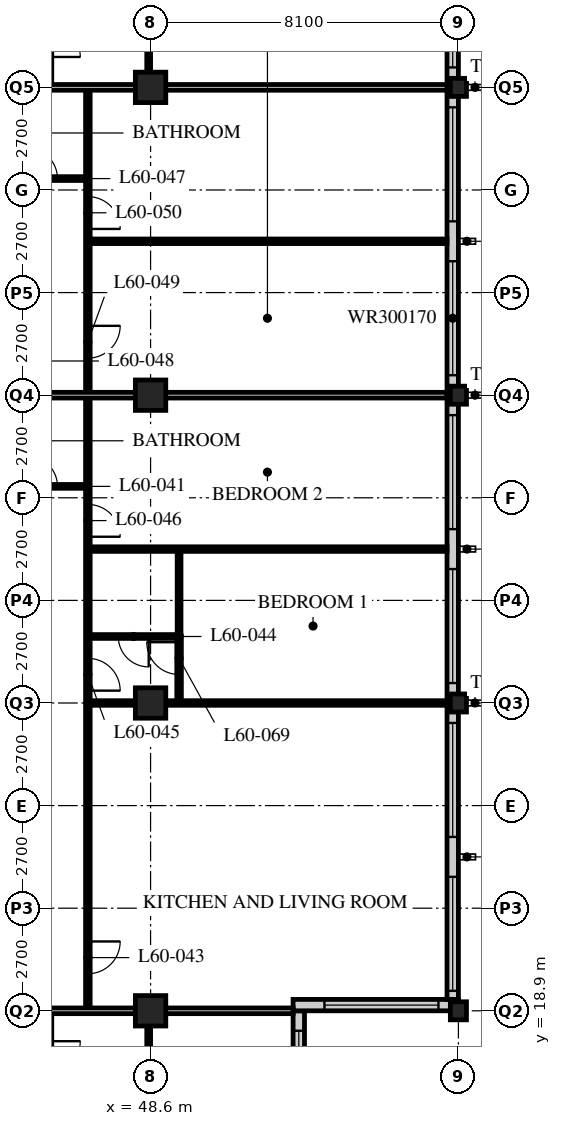
"""IFC4 building model, lengths in metres.
Left out: names, types, materials, properties, quantities, classifications, styles, units other than length and angle.
Written with IfcOpenShell. Run it as: python <this file> out.ifc"""

import sys

from ifc_helpers import new_model, si_unit, direction, frame, frame_2d, origin, origin_2d, place, context, subcontext, project, spatial, rectangle, hollow_rectangle, i_section, extrude, element, fill, save


model = new_model("IFC4")
c1 = context("Model", 3, precision=1e-05, world=origin(), true_north=direction((0.0, 1.0)))
c2 = subcontext(c1, "Body", "Model", "MODEL_VIEW")
j1 = project(units=[si_unit("LENGTHUNIT", "METRE"), si_unit("PLANEANGLEUNIT", "RADIAN")], contexts=[c1])
p1 = place(None, origin())
s1 = spatial("IfcSite", under=j1, at=p1, CompositionType="ELEMENT")
p2 = place(p1, origin())
s2 = spatial("IfcBuilding", under=s1, at=p2, CompositionType="ELEMENT")
p3 = place(p2, frame((0.0, 0.0, 231.6)))
s3 = spatial("IfcBuildingStorey", under=s2, at=p3, CompositionType="ELEMENT", Elevation=231.6)
for number, where, z_axis, x_axis in (
    (1, (48.6, 18.9, 0.0), (0.0, 0.0, 1.0), (1.0, 0.0, 0.0)),
    (2, (48.6, 27.0, 0.0), (0.0, 0.0, 1.0), (1.0, 0.0, 0.0)),
    (3, (48.6, 35.1, 0.0), (0.0, 0.0, 1.0), (1.0, 0.0, 0.0)),
    (4, (48.6, 43.2, 0.0), (0.0, 0.0, 1.0), (1.0, 0.0, 0.0)),
):
    element("IfcColumn", number, at=place(p3, frame(where, z_axis=z_axis, x_axis=x_axis)), inside=s3, PredefinedType="COLUMN", context=c2, shape_type="SweptSolid", body=[
        extrude(hollow_rectangle(XDim=0.8, YDim=0.8, WallThickness=0.08, at=origin_2d()), origin(), (0.0, 0.0, 1.0), 3.6),
    ])
for number, where, z_axis, x_axis in (
    (5, (56.7, 18.9, 0.0), (0.0, 0.0, 1.0), (1.0, 0.0, 0.0)),
    (6, (56.7, 27.0, 0.0), (0.0, 0.0, 1.0), (1.0, 0.0, 0.0)),
    (7, (56.7, 35.1, 0.0), (0.0, 0.0, 1.0), (1.0, 0.0, 0.0)),
    (8, (56.7, 43.2, 0.0), (0.0, 0.0, 1.0), (1.0, 0.0, 0.0)),
):
    element("IfcColumn", number, at=place(p3, frame(where, z_axis=z_axis, x_axis=x_axis)), inside=s3, PredefinedType="COLUMN", context=c2, shape_type="SweptSolid", body=[
        extrude(i_section(OverallWidth=0.424, OverallDepth=0.475, WebThickness=0.048, FlangeThickness=0.077, FilletRadius=0.015, at=origin_2d()), origin(), (0.0, 0.0, 1.0), 3.6),
    ])
p4 = place(p3, frame((52.5, 15.15, 0.0), z_axis=(0.0, 0.0, 1.0), x_axis=(0.0, 1.0, 0.0)))
e9 = element("IfcWall", 9, at=p4, inside=s3, PredefinedType="SOLIDWALL", context=c2, shape_type="SweptSolid", body=[
    extrude(rectangle(XDim=3.75, YDim=0.3, at=frame_2d((1.875, 0.0))), origin(), (0.0, 0.0, 1.0), 2.65),
])
p5 = place(p4, frame((0.225, 0.0, 0.6)))
e10 = element("IfcOpeningElement", 10, at=p5, cuts=e9, PredefinedType="OPENING", context=c2, shape_type="SweptSolid", body=[
    extrude(rectangle(XDim=3.0, YDim=1.7, at=frame_2d((1.5, 0.85))), frame((0.0, 0.16, 0.0), z_axis=(0.0, -1.0, 0.0), x_axis=(1.0, 0.0, 0.0)), (0.0, 0.0, 1.0), 0.32),
])
p6 = place(p3, frame((52.35, 19.05, 0.0), z_axis=(0.0, 0.0, 1.0), x_axis=(1.0, 0.0, 0.0)))
e11 = element("IfcWall", 11, at=p6, inside=s3, PredefinedType="SOLIDWALL", context=c2, shape_type="SweptSolid", body=[
    extrude(rectangle(XDim=4.35, YDim=0.3, at=frame_2d((2.175, 0.0))), origin(), (0.0, 0.0, 1.0), 2.35),
])
p7 = place(p6, frame((0.825, 0.0, 0.6)))
e12 = element("IfcOpeningElement", 12, at=p7, cuts=e11, PredefinedType="OPENING", context=c2, shape_type="SweptSolid", body=[
    extrude(rectangle(XDim=3.0, YDim=1.7, at=frame_2d((1.5, 0.85))), frame((0.0, 0.16, 0.0), z_axis=(0.0, -1.0, 0.0), x_axis=(1.0, 0.0, 0.0)), (0.0, 0.0, 1.0), 0.32),
])
p8 = place(p3, frame((56.55, 19.2, 0.0), z_axis=(0.0, 0.0, 1.0), x_axis=(0.0, 1.0, 0.0)))
e13 = element("IfcWall", 13, at=p8, inside=s3, PredefinedType="SOLIDWALL", context=c2, shape_type="SweptSolid", body=[
    extrude(rectangle(XDim=32.1, YDim=0.3, at=frame_2d((16.05, 0.0))), origin(), (0.0, 0.0, 1.0), 2.35),
])
p9 = place(p8, frame((0.225, 0.0, 0.6)))
e14 = element("IfcOpeningElement", 14, at=p9, cuts=e13, PredefinedType="OPENING", context=c2, shape_type="SweptSolid", body=[
    extrude(rectangle(XDim=3.0, YDim=1.7, at=frame_2d((1.5, 0.85))), frame((0.0, 0.16, 0.0), z_axis=(0.0, -1.0, 0.0), x_axis=(1.0, 0.0, 0.0)), (0.0, 0.0, 1.0), 0.32),
])
p10 = place(p8, frame((4.275, 0.0, 0.6)))
e15 = element("IfcOpeningElement", 15, at=p10, cuts=e13, PredefinedType="OPENING", context=c2, shape_type="SweptSolid", body=[
    extrude(rectangle(XDim=3.0, YDim=1.7, at=frame_2d((1.5, 0.85))), frame((0.0, 0.16, 0.0), z_axis=(0.0, -1.0, 0.0), x_axis=(1.0, 0.0, 0.0)), (0.0, 0.0, 1.0), 0.32),
])
p11 = place(p8, frame((8.325, 0.0, 0.6)))
e16 = element("IfcOpeningElement", 16, at=p11, cuts=e13, PredefinedType="OPENING", context=c2, shape_type="SweptSolid", body=[
    extrude(rectangle(XDim=3.0, YDim=1.7, at=frame_2d((1.5, 0.85))), frame((0.0, 0.16, 0.0), z_axis=(0.0, -1.0, 0.0), x_axis=(1.0, 0.0, 0.0)), (0.0, 0.0, 1.0), 0.32),
])
p12 = place(p8, frame((12.375, 0.0, 0.6)))
e17 = element("IfcOpeningElement", 17, at=p12, cuts=e13, PredefinedType="OPENING", context=c2, shape_type="SweptSolid", body=[
    extrude(rectangle(XDim=3.0, YDim=1.7, at=frame_2d((1.5, 0.85))), frame((0.0, 0.16, 0.0), z_axis=(0.0, -1.0, 0.0), x_axis=(1.0, 0.0, 0.0)), (0.0, 0.0, 1.0), 0.32),
])
p13 = place(p8, frame((16.425, 0.0, 0.6)))
e18 = element("IfcOpeningElement", 18, at=p13, cuts=e13, PredefinedType="OPENING", context=c2, shape_type="SweptSolid", body=[
    extrude(rectangle(XDim=3.0, YDim=1.7, at=frame_2d((1.5, 0.85))), frame((0.0, 0.16, 0.0), z_axis=(0.0, -1.0, 0.0), x_axis=(1.0, 0.0, 0.0)), (0.0, 0.0, 1.0), 0.32),
])
p14 = place(p8, frame((20.475, 0.0, 0.6)))
e19 = element("IfcOpeningElement", 19, at=p14, cuts=e13, PredefinedType="OPENING", context=c2, shape_type="SweptSolid", body=[
    extrude(rectangle(XDim=3.0, YDim=1.7, at=frame_2d((1.5, 0.85))), frame((0.0, 0.16, 0.0), z_axis=(0.0, -1.0, 0.0), x_axis=(1.0, 0.0, 0.0)), (0.0, 0.0, 1.0), 0.32),
])
p15 = place(p8, frame((24.525, 0.0, 0.6)))
e20 = element("IfcOpeningElement", 20, at=p15, cuts=e13, PredefinedType="OPENING", context=c2, shape_type="SweptSolid", body=[
    extrude(rectangle(XDim=3.0, YDim=1.7, at=frame_2d((1.5, 0.85))), frame((0.0, 0.16, 0.0), z_axis=(0.0, -1.0, 0.0), x_axis=(1.0, 0.0, 0.0)), (0.0, 0.0, 1.0), 0.32),
])
p16 = place(p8, frame((28.575, 0.0, 0.6)))
e21 = element("IfcOpeningElement", 21, at=p16, cuts=e13, PredefinedType="OPENING", context=c2, shape_type="SweptSolid", body=[
    extrude(rectangle(XDim=3.0, YDim=1.7, at=frame_2d((1.5, 0.85))), frame((0.0, 0.16, 0.0), z_axis=(0.0, -1.0, 0.0), x_axis=(1.0, 0.0, 0.0)), (0.0, 0.0, 1.0), 0.32),
])
p17 = place(p3, frame((46.95, 18.9, 0.0), z_axis=(0.0, 0.0, 1.0), x_axis=(0.0, 1.0, 0.0)))
e22 = element("IfcWall", 22, at=p17, inside=s3, PredefinedType="PARTITIONING", context=c2, shape_type="SweptSolid", body=[
    extrude(rectangle(XDim=24.3, YDim=0.12, at=frame_2d((12.15, 0.0))), origin(), (0.0, 0.0, 1.0), 3.35),
])
p18 = place(p17, frame((0.975, 0.0, 0.0)))
e23 = element("IfcOpeningElement", 23, at=p18, cuts=e22, PredefinedType="OPENING", context=c2, shape_type="SweptSolid", body=[
    extrude(rectangle(XDim=0.85, YDim=2.1, at=frame_2d((0.425, 1.05))), frame((0.0, 0.07, 0.0), z_axis=(0.0, -1.0, 0.0), x_axis=(1.0, 0.0, 0.0)), (0.0, 0.0, 1.0), 0.14),
])
p19 = place(p17, frame((8.425, 0.0, 0.0)))
e24 = element("IfcOpeningElement", 24, at=p19, cuts=e22, PredefinedType="OPENING", context=c2, shape_type="SweptSolid", body=[
    extrude(rectangle(XDim=0.85, YDim=2.1, at=frame_2d((0.425, 1.05))), frame((0.0, 0.07, 0.0), z_axis=(0.0, -1.0, 0.0), x_axis=(1.0, 0.0, 0.0)), (0.0, 0.0, 1.0), 0.14),
])
p20 = place(p17, frame((12.475, 0.0, 0.0)))
e25 = element("IfcOpeningElement", 25, at=p20, cuts=e22, PredefinedType="OPENING", context=c2, shape_type="SweptSolid", body=[
    extrude(rectangle(XDim=0.85, YDim=2.1, at=frame_2d((0.425, 1.05))), frame((0.0, 0.07, 0.0), z_axis=(0.0, -1.0, 0.0), x_axis=(1.0, 0.0, 0.0)), (0.0, 0.0, 1.0), 0.14),
])
p21 = place(p17, frame((17.175, 0.0, 0.0)))
e26 = element("IfcOpeningElement", 26, at=p21, cuts=e22, PredefinedType="OPENING", context=c2, shape_type="SweptSolid", body=[
    extrude(rectangle(XDim=0.85, YDim=2.1, at=frame_2d((0.425, 1.05))), frame((0.0, 0.07, 0.0), z_axis=(0.0, -1.0, 0.0), x_axis=(1.0, 0.0, 0.0)), (0.0, 0.0, 1.0), 0.14),
])
p22 = place(p17, frame((20.575, 0.0, 0.0)))
e27 = element("IfcOpeningElement", 27, at=p22, cuts=e22, PredefinedType="OPENING", context=c2, shape_type="SweptSolid", body=[
    extrude(rectangle(XDim=0.85, YDim=2.1, at=frame_2d((0.425, 1.05))), frame((0.0, 0.07, 0.0), z_axis=(0.0, -1.0, 0.0), x_axis=(1.0, 0.0, 0.0)), (0.0, 0.0, 1.0), 0.14),
])
p23 = place(p3, frame((44.55, 32.7, 0.0), z_axis=(0.0, 0.0, 1.0), x_axis=(1.0, 0.0, 0.0)))
e28 = element("IfcWall", 28, at=p23, inside=s3, PredefinedType="PARTITIONING", context=c2, shape_type="SweptSolid", body=[
    extrude(rectangle(XDim=2.4, YDim=0.1, at=frame_2d((1.2, 0.0))), origin(), (0.0, 0.0, 1.0), 3.35),
])
p24 = place(p23, frame((0.8, 0.0, 0.0)))
e29 = element("IfcOpeningElement", 29, at=p24, cuts=e28, PredefinedType="OPENING", context=c2, shape_type="SweptSolid", body=[
    extrude(rectangle(XDim=0.8, YDim=2.1, at=frame_2d((0.4, 1.05))), frame((0.0, 0.06, 0.0), z_axis=(0.0, -1.0, 0.0), x_axis=(1.0, 0.0, 0.0)), (0.0, 0.0, 1.0), 0.12),
])
p25 = place(p3, frame((46.95, 28.75, 0.0), z_axis=(0.0, 0.0, 1.0), x_axis=(1.0, 0.0, 0.0)))
e30 = element("IfcWall", 30, at=p25, inside=s3, PredefinedType="PARTITIONING", context=c2, shape_type="SweptSolid", body=[
    extrude(rectangle(XDim=2.4, YDim=0.1, at=frame_2d((1.2, 0.0))), origin(), (0.0, 0.0, 1.0), 3.35),
])
p26 = place(p25, frame((0.8, 0.0, 0.0)))
e31 = element("IfcOpeningElement", 31, at=p26, cuts=e30, PredefinedType="OPENING", context=c2, shape_type="SweptSolid", body=[
    extrude(rectangle(XDim=0.8, YDim=2.1, at=frame_2d((0.4, 1.05))), frame((0.0, 0.06, 0.0), z_axis=(0.0, -1.0, 0.0), x_axis=(1.0, 0.0, 0.0)), (0.0, 0.0, 1.0), 0.12),
])
p27 = place(p3, frame((49.35, 28.75, 0.0), z_axis=(0.0, 0.0, 1.0), x_axis=(0.0, 1.0, 0.0)))
e32 = element("IfcWall", 32, at=p27, inside=s3, PredefinedType="PARTITIONING", context=c2, shape_type="SweptSolid", body=[
    extrude(rectangle(XDim=2.3, YDim=0.1, at=frame_2d((1.15, 0.0))), origin(), (0.0, 0.0, 1.0), 3.35),
])
p28 = place(p3, frame((46.95, 27.0, 0.0), z_axis=(0.0, 0.0, 1.0), x_axis=(1.0, 0.0, 0.0)))
e33 = element("IfcWall", 33, at=p28, inside=s3, PredefinedType="PARTITIONING", context=c2, shape_type="SweptSolid", body=[
    extrude(rectangle(XDim=9.45, YDim=0.12, at=frame_2d((4.725, 0.0))), origin(), (0.0, 0.0, 1.0), 2.588),
])
p29 = place(p3, frame((46.95, 31.05, 0.0), z_axis=(0.0, 0.0, 1.0), x_axis=(1.0, 0.0, 0.0)))
e34 = element("IfcWall", 34, at=p29, inside=s3, PredefinedType="PARTITIONING", context=c2, shape_type="SweptSolid", body=[
    extrude(rectangle(XDim=9.45, YDim=0.12, at=frame_2d((4.725, 0.0))), origin(), (0.0, 0.0, 1.0), 3.35),
])
p30 = place(p3, frame((44.55, 35.1, 0.0), z_axis=(0.0, 0.0, 1.0), x_axis=(1.0, 0.0, 0.0)))
e35 = element("IfcWall", 35, at=p30, inside=s3, PredefinedType="PARTITIONING", context=c2, shape_type="SweptSolid", body=[
    extrude(rectangle(XDim=11.85, YDim=0.15, at=frame_2d((5.925, 0.0))), origin(), (0.0, 0.0, 1.0), 2.588),
])
p31 = place(p3, frame((44.55, 40.8, 0.0), z_axis=(0.0, 0.0, 1.0), x_axis=(1.0, 0.0, 0.0)))
e36 = element("IfcWall", 36, at=p31, inside=s3, PredefinedType="PARTITIONING", context=c2, shape_type="SweptSolid", body=[
    extrude(rectangle(XDim=2.4, YDim=0.1, at=frame_2d((1.2, 0.0))), origin(), (0.0, 0.0, 1.0), 3.35),
])
p32 = place(p31, frame((0.8, 0.0, 0.0)))
e37 = element("IfcOpeningElement", 37, at=p32, cuts=e36, PredefinedType="OPENING", context=c2, shape_type="SweptSolid", body=[
    extrude(rectangle(XDim=0.8, YDim=2.1, at=frame_2d((0.4, 1.05))), frame((0.0, 0.06, 0.0), z_axis=(0.0, -1.0, 0.0), x_axis=(1.0, 0.0, 0.0)), (0.0, 0.0, 1.0), 0.12),
])
p33 = place(p3, frame((46.95, 39.15, 0.0), z_axis=(0.0, 0.0, 1.0), x_axis=(1.0, 0.0, 0.0)))
e38 = element("IfcWall", 38, at=p33, inside=s3, PredefinedType="PARTITIONING", context=c2, shape_type="SweptSolid", body=[
    extrude(rectangle(XDim=9.45, YDim=0.12, at=frame_2d((4.725, 0.0))), origin(), (0.0, 0.0, 1.0), 3.35),
])
p34 = place(p3, frame((48.55, 18.9, 0.0), z_axis=(0.0, 0.0, 1.0), x_axis=(0.0, -1.0, 0.0)))
e39 = element("IfcWall", 39, at=p34, inside=s3, PredefinedType="PARTITIONING", context=c2, shape_type="SweptSolid", body=[
    extrude(rectangle(XDim=2.4, YDim=0.1, at=frame_2d((1.2, 0.0))), origin(), (0.0, 0.0, 1.0), 2.35),
])
p35 = place(p3, frame((44.55, 18.9, 0.0), z_axis=(0.0, 0.0, 1.0), x_axis=(1.0, 0.0, 0.0)))
e40 = element("IfcWall", 40, at=p35, inside=s3, PredefinedType="PARTITIONING", context=c2, shape_type="SweptSolid", body=[
    extrude(rectangle(XDim=7.8, YDim=0.15, at=frame_2d((3.9, 0.0))), origin(), (0.0, 0.0, 1.0), 2.35),
])
p36 = place(p3, frame((48.55, 43.2, 0.0), z_axis=(0.0, 0.0, 1.0), x_axis=(0.0, 1.0, 0.0)))
e41 = element("IfcWall", 41, at=p36, inside=s3, PredefinedType="PARTITIONING", context=c2, shape_type="SweptSolid", body=[
    extrude(rectangle(XDim=2.4, YDim=0.1, at=frame_2d((1.2, 0.0))), origin(), (0.0, 0.0, 1.0), 2.35),
])
p37 = place(p3, frame((44.55, 43.2, 0.0), z_axis=(0.0, 0.0, 1.0), x_axis=(1.0, 0.0, 0.0)))
e42 = element("IfcWall", 42, at=p37, inside=s3, PredefinedType="PARTITIONING", context=c2, shape_type="SweptSolid", body=[
    extrude(rectangle(XDim=11.85, YDim=0.15, at=frame_2d((5.925, 0.0))), origin(), (0.0, 0.0, 1.0), 2.35),
])
p38 = place(p3, frame((49.35, 28.76, 0.0), z_axis=(0.0, 0.0, 1.0), x_axis=(0.0, -1.0, 0.0)))
e43 = element("IfcWall", 43, at=p38, inside=s3, PredefinedType="PARTITIONING", context=c2, shape_type="SweptSolid", body=[
    extrude(rectangle(XDim=1.76, YDim=0.12, at=frame_2d((0.88, 0.0))), origin(), (0.0, 0.0, 1.0), 3.35),
])
p39 = place(p38, frame((0.16, 0.0, 0.0)))
e44 = element("IfcOpeningElement", 44, at=p39, cuts=e43, PredefinedType="OPENING", context=c2, shape_type="SweptSolid", body=[
    extrude(rectangle(XDim=0.85, YDim=2.1, at=frame_2d((0.425, 1.05))), frame((0.0, 0.07, 0.0), z_axis=(0.0, -1.0, 0.0), x_axis=(1.0, 0.0, 0.0)), (0.0, 0.0, 1.0), 0.14),
])
p40 = place(p5, origin())
e45 = element("IfcWindow", 45, at=p40, inside=s3, PartitioningType="SINGLE_PANEL", PredefinedType="WINDOW", context=c2, shape_type="SweptSolid", body=[
    extrude(rectangle(XDim=3.0, YDim=1.7, at=frame_2d((1.5, 0.85))), frame((0.0, 0.03, 0.0), z_axis=(0.0, -1.0, 0.0), x_axis=(1.0, 0.0, 0.0)), (0.0, 0.0, 1.0), 0.06),
])
fill(e10, e45)
p41 = place(p7, origin())
e46 = element("IfcWindow", 46, at=p41, inside=s3, PartitioningType="SINGLE_PANEL", PredefinedType="WINDOW", context=c2, shape_type="SweptSolid", body=[
    extrude(rectangle(XDim=3.0, YDim=1.7, at=frame_2d((1.5, 0.85))), frame((0.0, 0.03, 0.0), z_axis=(0.0, -1.0, 0.0), x_axis=(1.0, 0.0, 0.0)), (0.0, 0.0, 1.0), 0.06),
])
fill(e12, e46)
p42 = place(p9, origin())
e47 = element("IfcWindow", 47, at=p42, inside=s3, PartitioningType="SINGLE_PANEL", PredefinedType="WINDOW", context=c2, shape_type="SweptSolid", body=[
    extrude(rectangle(XDim=3.0, YDim=1.7, at=frame_2d((1.5, 0.85))), frame((0.0, 0.03, 0.0), z_axis=(0.0, -1.0, 0.0), x_axis=(1.0, 0.0, 0.0)), (0.0, 0.0, 1.0), 0.06),
])
fill(e14, e47)
p43 = place(p10, origin())
e48 = element("IfcWindow", 48, at=p43, inside=s3, PartitioningType="SINGLE_PANEL", PredefinedType="WINDOW", context=c2, shape_type="SweptSolid", body=[
    extrude(rectangle(XDim=3.0, YDim=1.7, at=frame_2d((1.5, 0.85))), frame((0.0, 0.03, 0.0), z_axis=(0.0, -1.0, 0.0), x_axis=(1.0, 0.0, 0.0)), (0.0, 0.0, 1.0), 0.06),
])
fill(e15, e48)
p44 = place(p11, origin())
e49 = element("IfcWindow", 49, at=p44, inside=s3, PartitioningType="SINGLE_PANEL", PredefinedType="WINDOW", context=c2, shape_type="SweptSolid", body=[
    extrude(rectangle(XDim=3.0, YDim=1.7, at=frame_2d((1.5, 0.85))), frame((0.0, 0.03, 0.0), z_axis=(0.0, -1.0, 0.0), x_axis=(1.0, 0.0, 0.0)), (0.0, 0.0, 1.0), 0.06),
])
fill(e16, e49)
p45 = place(p12, origin())
e50 = element("IfcWindow", 50, at=p45, inside=s3, PartitioningType="SINGLE_PANEL", PredefinedType="WINDOW", context=c2, shape_type="SweptSolid", body=[
    extrude(rectangle(XDim=3.0, YDim=1.7, at=frame_2d((1.5, 0.85))), frame((0.0, 0.03, 0.0), z_axis=(0.0, -1.0, 0.0), x_axis=(1.0, 0.0, 0.0)), (0.0, 0.0, 1.0), 0.06),
])
fill(e17, e50)
p46 = place(p13, origin())
e51 = element("IfcWindow", 51, at=p46, inside=s3, PartitioningType="SINGLE_PANEL", PredefinedType="WINDOW", context=c2, shape_type="SweptSolid", body=[
    extrude(rectangle(XDim=3.0, YDim=1.7, at=frame_2d((1.5, 0.85))), frame((0.0, 0.03, 0.0), z_axis=(0.0, -1.0, 0.0), x_axis=(1.0, 0.0, 0.0)), (0.0, 0.0, 1.0), 0.06),
])
fill(e18, e51)
p47 = place(p14, origin())
e52 = element("IfcWindow", 52, at=p47, inside=s3, PartitioningType="SINGLE_PANEL", PredefinedType="WINDOW", context=c2, shape_type="SweptSolid", body=[
    extrude(rectangle(XDim=3.0, YDim=1.7, at=frame_2d((1.5, 0.85))), frame((0.0, 0.03, 0.0), z_axis=(0.0, -1.0, 0.0), x_axis=(1.0, 0.0, 0.0)), (0.0, 0.0, 1.0), 0.06),
])
fill(e19, e52)
p48 = place(p15, origin())
e53 = element("IfcWindow", 53, at=p48, inside=s3, PartitioningType="SINGLE_PANEL", PredefinedType="WINDOW", context=c2, shape_type="SweptSolid", body=[
    extrude(rectangle(XDim=3.0, YDim=1.7, at=frame_2d((1.5, 0.85))), frame((0.0, 0.03, 0.0), z_axis=(0.0, -1.0, 0.0), x_axis=(1.0, 0.0, 0.0)), (0.0, 0.0, 1.0), 0.06),
])
fill(e20, e53)
p49 = place(p24, origin())
e54 = element("IfcDoor", 54, at=p49, inside=s3, OperationType="SINGLE_SWING_LEFT", PredefinedType="DOOR", context=c2, shape_type="SweptSolid", body=[
    extrude(rectangle(XDim=0.8, YDim=2.1, at=frame_2d((0.4, 1.05))), frame((0.0, 0.025, 0.0), z_axis=(0.0, -1.0, 0.0), x_axis=(1.0, 0.0, 0.0)), (0.0, 0.0, 1.0), 0.05),
])
fill(e29, e54)
p50 = place(p18, origin())
e55 = element("IfcDoor", 55, at=p50, inside=s3, OperationType="SINGLE_SWING_LEFT", PredefinedType="DOOR", context=c2, shape_type="SweptSolid", body=[
    extrude(rectangle(XDim=0.85, YDim=2.1, at=frame_2d((0.425, 1.05))), frame((0.0, 0.025, 0.0), z_axis=(0.0, -1.0, 0.0), x_axis=(1.0, 0.0, 0.0)), (0.0, 0.0, 1.0), 0.05),
])
fill(e23, e55)
p51 = place(p26, origin())
e56 = element("IfcDoor", 56, at=p51, inside=s3, OperationType="SINGLE_SWING_LEFT", PredefinedType="DOOR", context=c2, shape_type="SweptSolid", body=[
    extrude(rectangle(XDim=0.8, YDim=2.1, at=frame_2d((0.4, 1.05))), frame((0.0, 0.025, 0.0), z_axis=(0.0, -1.0, 0.0), x_axis=(1.0, 0.0, 0.0)), (0.0, 0.0, 1.0), 0.05),
])
fill(e31, e56)
p52 = place(p19, origin())
e57 = element("IfcDoor", 57, at=p52, inside=s3, OperationType="SINGLE_SWING_RIGHT", PredefinedType="DOOR", context=c2, shape_type="SweptSolid", body=[
    extrude(rectangle(XDim=0.85, YDim=2.1, at=frame_2d((0.425, 1.05))), frame((0.0, 0.025, 0.0), z_axis=(0.0, -1.0, 0.0), x_axis=(1.0, 0.0, 0.0)), (0.0, 0.0, 1.0), 0.05),
])
fill(e24, e57)
p53 = place(p20, origin())
e58 = element("IfcDoor", 58, at=p53, inside=s3, OperationType="SINGLE_SWING_RIGHT", PredefinedType="DOOR", context=c2, shape_type="SweptSolid", body=[
    extrude(rectangle(XDim=0.85, YDim=2.1, at=frame_2d((0.425, 1.05))), frame((0.0, 0.025, 0.0), z_axis=(0.0, -1.0, 0.0), x_axis=(1.0, 0.0, 0.0)), (0.0, 0.0, 1.0), 0.05),
])
fill(e25, e58)
p54 = place(p32, origin())
e59 = element("IfcDoor", 59, at=p54, inside=s3, OperationType="SINGLE_SWING_LEFT", PredefinedType="DOOR", context=c2, shape_type="SweptSolid", body=[
    extrude(rectangle(XDim=0.8, YDim=2.1, at=frame_2d((0.4, 1.05))), frame((0.0, 0.025, 0.0), z_axis=(0.0, -1.0, 0.0), x_axis=(1.0, 0.0, 0.0)), (0.0, 0.0, 1.0), 0.05),
])
fill(e37, e59)
p55 = place(p21, origin())
e60 = element("IfcDoor", 60, at=p55, inside=s3, OperationType="SINGLE_SWING_LEFT", PredefinedType="DOOR", context=c2, shape_type="SweptSolid", body=[
    extrude(rectangle(XDim=0.85, YDim=2.1, at=frame_2d((0.425, 1.05))), frame((0.0, 0.025, 0.0), z_axis=(0.0, -1.0, 0.0), x_axis=(1.0, 0.0, 0.0)), (0.0, 0.0, 1.0), 0.05),
])
fill(e26, e60)
p56 = place(p22, origin())
e61 = element("IfcDoor", 61, at=p56, inside=s3, OperationType="SINGLE_SWING_RIGHT", PredefinedType="DOOR", context=c2, shape_type="SweptSolid", body=[
    extrude(rectangle(XDim=0.85, YDim=2.1, at=frame_2d((0.425, 1.05))), frame((0.0, 0.025, 0.0), z_axis=(0.0, -1.0, 0.0), x_axis=(1.0, 0.0, 0.0)), (0.0, 0.0, 1.0), 0.05),
])
fill(e27, e61)
p57 = place(p39, origin())
e62 = element("IfcDoor", 62, at=p57, inside=s3, OperationType="SINGLE_SWING_RIGHT", PredefinedType="DOOR", context=c2, shape_type="SweptSolid", body=[
    extrude(rectangle(XDim=0.85, YDim=2.1, at=frame_2d((0.425, 1.05))), frame((0.0, 0.025, 0.0), z_axis=(0.0, -1.0, 0.0), x_axis=(1.0, 0.0, 0.0)), (0.0, 0.0, 1.0), 0.05),
])
fill(e44, e62)
save(model, sys.argv[1])
